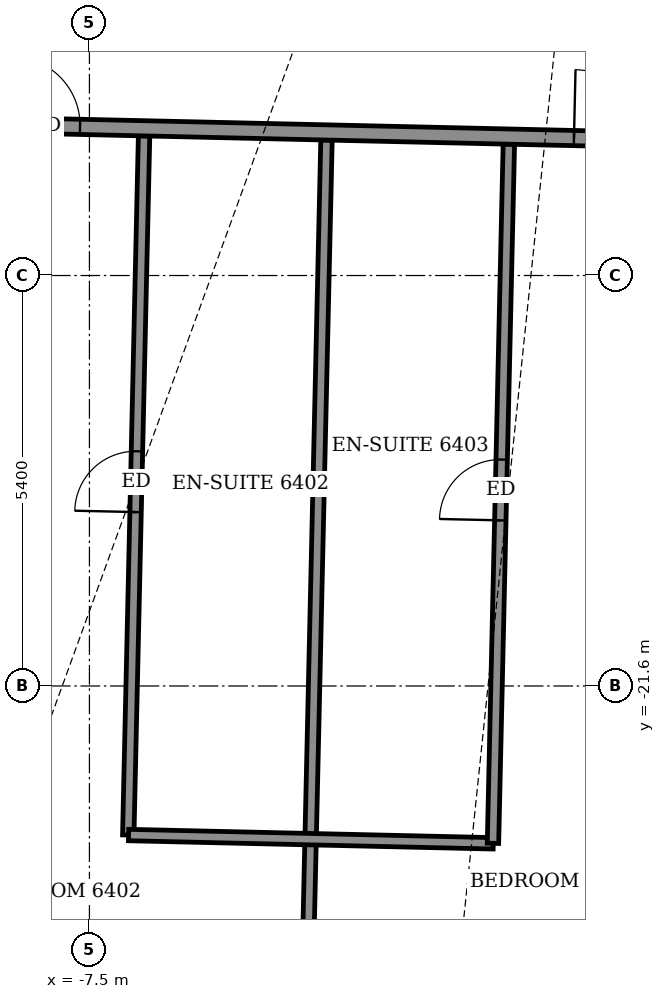
"""IFC4 building model, lengths in metres.
Left out: names, types, materials, properties, quantities, classifications, styles, units other than length and angle.
Written with IfcOpenShell. Run it as: python <this file> out.ifc"""

import sys

from ifc_helpers import new_model, si_unit, direction, frame, frame_2d, origin, place, context, subcontext, project, spatial, rectangle, extrude, element, fill, save


model = new_model("IFC4")
c1 = context("Model", 3, precision=1e-05, world=origin(), true_north=direction((0.0, 1.0)))
c2 = subcontext(c1, "Body", "Model", "MODEL_VIEW")
j1 = project(units=[si_unit("LENGTHUNIT", "METRE"), si_unit("PLANEANGLEUNIT", "RADIAN")], contexts=[c1])
p1 = place(None, origin())
s1 = spatial("IfcSite", under=j1, at=p1, CompositionType="ELEMENT")
p2 = place(p1, origin())
s2 = spatial("IfcBuilding", under=s1, at=p2, CompositionType="ELEMENT")
p3 = place(p2, frame((0.0, 0.0, 252.7)))
s3 = spatial("IfcBuildingStorey", under=s2, at=p3, CompositionType="ELEMENT", Elevation=252.7)
p4 = place(p3, frame((-4.663, -26.814, 0.0), z_axis=(0.0, 0.0, 1.0), x_axis=(0.022741979748, 0.999741367733, 0.0)))
e1 = element("IfcWall", 1, at=p4, inside=s3, PredefinedType="PARTITIONING", context=c2, shape_type="SweptSolid", body=[
    extrude(rectangle(XDim=12.399, YDim=0.15, at=frame_2d((6.2, 0.0))), origin(), (0.0, 0.0, 1.0), 2.45),
])
p5 = place(p3, frame((-6.989, -23.561, 0.0), z_axis=(0.0, 0.0, 1.0), x_axis=(0.022608685365, 0.999744391005, 0.0)))
e2 = element("IfcWall", 2, at=p5, inside=s3, PredefinedType="PARTITIONING", context=c2, shape_type="SweptSolid", body=[
    extrude(rectangle(XDim=9.2, YDim=0.15, at=frame_2d((4.6, 0.0))), origin(), (0.0, 0.0, 1.0), 2.55),
])
p6 = place(p5, frame((4.25, 0.0, 0.0)))
e3 = element("IfcOpeningElement", 3, at=p6, cuts=e2, PredefinedType="OPENING", context=c2, shape_type="SweptSolid", body=[
    extrude(rectangle(XDim=0.8, YDim=2.1, at=frame_2d((0.4, 1.05))), frame((0.0, 0.085, 0.0), z_axis=(0.0, -1.0, 0.0), x_axis=(1.0, 0.0, 0.0)), (0.0, 0.0, 1.0), 0.17),
])
p7 = place(p3, frame((-6.985, -23.561, 0.0), z_axis=(0.0, 0.0, 1.0), x_axis=(0.999742596585, -0.02268789488, 0.0)))
e4 = element("IfcWall", 4, at=p7, inside=s3, PredefinedType="PARTITIONING", context=c2, shape_type="SweptSolid", body=[
    extrude(rectangle(XDim=4.799, YDim=0.15, at=frame_2d((2.4, 0.0))), origin(), (0.0, 0.0, 1.0), 2.65),
])
p8 = place(p3, frame((-2.191, -23.67, 0.0), z_axis=(0.0, 0.0, 1.0), x_axis=(0.02271477479, 0.999741986218, 0.0)))
e5 = element("IfcWall", 5, at=p8, inside=s3, PredefinedType="PARTITIONING", context=c2, shape_type="SweptSolid", body=[
    extrude(rectangle(XDim=9.2, YDim=0.15, at=frame_2d((4.6, 0.0))), origin(), (0.0, 0.0, 1.0), 2.65),
])
p9 = place(p8, frame((4.25, 0.0, 0.0)))
e6 = element("IfcOpeningElement", 6, at=p9, cuts=e5, PredefinedType="OPENING", context=c2, shape_type="SweptSolid", body=[
    extrude(rectangle(XDim=0.8, YDim=2.1, at=frame_2d((0.4, 1.05))), frame((0.0, 0.085, 0.0), z_axis=(0.0, -1.0, 0.0), x_axis=(1.0, 0.0, 0.0)), (0.0, 0.0, 1.0), 0.17),
])
p10 = place(p3, frame((-25.619, -13.836, 0.0), z_axis=(0.0, 0.0, 1.0), x_axis=(0.999742808343, -0.022678561832, 0.0)))
e7 = element("IfcWall", 7, at=p10, inside=s3, PredefinedType="PARTITIONING", context=c2, shape_type="SweptSolid", body=[
    extrude(rectangle(XDim=48.282, YDim=0.2, at=frame_2d((24.141, 0.0))), origin(), (0.0, 0.0, 1.0), 2.45),
])
p11 = place(p10, frame((3.125, 0.0, 0.0)))
e8 = element("IfcOpeningElement", 8, at=p11, cuts=e7, PredefinedType="OPENING", context=c2, shape_type="SweptSolid", body=[
    extrude(rectangle(XDim=1.0, YDim=2.1, at=frame_2d((0.5, 1.05))), frame((0.0, 0.11, 0.0), z_axis=(0.0, -1.0, 0.0), x_axis=(1.0, 0.0, 0.0)), (0.0, 0.0, 1.0), 0.22),
])
p12 = place(p10, frame((9.5, 0.0, 0.0)))
e9 = element("IfcOpeningElement", 9, at=p12, cuts=e7, PredefinedType="OPENING", context=c2, shape_type="SweptSolid", body=[
    extrude(rectangle(XDim=0.9, YDim=2.1, at=frame_2d((0.45, 1.05))), frame((0.0, 0.11, 0.0), z_axis=(0.0, -1.0, 0.0), x_axis=(1.0, 0.0, 0.0)), (0.0, 0.0, 1.0), 0.22),
])
p13 = place(p10, frame((14.5, 0.0, 0.0)))
e10 = element("IfcOpeningElement", 10, at=p13, cuts=e7, PredefinedType="OPENING", context=c2, shape_type="SweptSolid", body=[
    extrude(rectangle(XDim=0.9, YDim=2.1, at=frame_2d((0.45, 1.05))), frame((0.0, 0.11, 0.0), z_axis=(0.0, -1.0, 0.0), x_axis=(1.0, 0.0, 0.0)), (0.0, 0.0, 1.0), 0.22),
])
p14 = place(p10, frame((17.1, 0.0, 0.0)))
e11 = element("IfcOpeningElement", 11, at=p14, cuts=e7, PredefinedType="OPENING", context=c2, shape_type="SweptSolid", body=[
    extrude(rectangle(XDim=0.9, YDim=2.1, at=frame_2d((0.45, 1.05))), frame((0.0, 0.11, 0.0), z_axis=(0.0, -1.0, 0.0), x_axis=(1.0, 0.0, 0.0)), (0.0, 0.0, 1.0), 0.22),
])
p15 = place(p10, frame((24.5, 0.0, 0.0)))
e12 = element("IfcOpeningElement", 12, at=p15, cuts=e7, PredefinedType="OPENING", context=c2, shape_type="SweptSolid", body=[
    extrude(rectangle(XDim=0.9, YDim=2.1, at=frame_2d((0.45, 1.05))), frame((0.0, 0.11, 0.0), z_axis=(0.0, -1.0, 0.0), x_axis=(1.0, 0.0, 0.0)), (0.0, 0.0, 1.0), 0.22),
])
p16 = place(p10, frame((27.1, 0.0, 0.0)))
e13 = element("IfcOpeningElement", 13, at=p16, cuts=e7, PredefinedType="OPENING", context=c2, shape_type="SweptSolid", body=[
    extrude(rectangle(XDim=0.9, YDim=2.1, at=frame_2d((0.45, 1.05))), frame((0.0, 0.11, 0.0), z_axis=(0.0, -1.0, 0.0), x_axis=(1.0, 0.0, 0.0)), (0.0, 0.0, 1.0), 0.22),
])
p17 = place(p10, frame((35.825, 0.0, 0.0)))
e14 = element("IfcOpeningElement", 14, at=p17, cuts=e7, PredefinedType="OPENING", context=c2, shape_type="SweptSolid", body=[
    extrude(rectangle(XDim=1.0, YDim=2.1, at=frame_2d((0.5, 1.05))), frame((0.0, 0.11, 0.0), z_axis=(0.0, -1.0, 0.0), x_axis=(1.0, 0.0, 0.0)), (0.0, 0.0, 1.0), 0.22),
])
p18 = place(p10, frame((32.1, 0.0, 0.0)))
e15 = element("IfcOpeningElement", 15, at=p18, cuts=e7, PredefinedType="OPENING", context=c2, shape_type="SweptSolid", body=[
    extrude(rectangle(XDim=0.9, YDim=2.1, at=frame_2d((0.45, 1.05))), frame((0.0, 0.11, 0.0), z_axis=(0.0, -1.0, 0.0), x_axis=(1.0, 0.0, 0.0)), (0.0, 0.0, 1.0), 0.22),
])
p19 = place(p10, frame((39.825, 0.0, 0.0)))
e16 = element("IfcOpeningElement", 16, at=p19, cuts=e7, PredefinedType="OPENING", context=c2, shape_type="SweptSolid", body=[
    extrude(rectangle(XDim=1.0, YDim=2.1, at=frame_2d((0.5, 1.05))), frame((0.0, 0.11, 0.0), z_axis=(0.0, -1.0, 0.0), x_axis=(1.0, 0.0, 0.0)), (0.0, 0.0, 1.0), 0.22),
])
p20 = place(p10, frame((47.083, 0.0, 0.0)))
e17 = element("IfcOpeningElement", 17, at=p20, cuts=e7, PredefinedType="OPENING", context=c2, shape_type="SweptSolid", body=[
    extrude(rectangle(XDim=1.0, YDim=2.1, at=frame_2d((0.5, 1.05))), frame((0.0, 0.11, 0.0), z_axis=(0.0, -1.0, 0.0), x_axis=(1.0, 0.0, 0.0)), (0.0, 0.0, 1.0), 0.22),
])
p21 = place(p14, origin())
e18 = element("IfcDoor", 18, at=p21, inside=s3, OperationType="SINGLE_SWING_RIGHT", PredefinedType="DOOR", context=c2, shape_type="SweptSolid", body=[
    extrude(rectangle(XDim=0.9, YDim=2.1, at=frame_2d((0.45, 1.05))), frame((0.0, 0.025, 0.0), z_axis=(0.0, -1.0, 0.0), x_axis=(1.0, 0.0, 0.0)), (0.0, 0.0, 1.0), 0.05),
])
fill(e11, e18)
p22 = place(p6, origin())
e19 = element("IfcDoor", 19, at=p22, inside=s3, OperationType="SINGLE_SWING_RIGHT", PredefinedType="DOOR", context=c2, shape_type="SweptSolid", body=[
    extrude(rectangle(XDim=0.8, YDim=2.1, at=frame_2d((0.4, 1.05))), frame((0.0, 0.025, 0.0), z_axis=(0.0, -1.0, 0.0), x_axis=(1.0, 0.0, 0.0)), (0.0, 0.0, 1.0), 0.05),
])
fill(e3, e19)
p23 = place(p15, origin())
e20 = element("IfcDoor", 20, at=p23, inside=s3, OperationType="SINGLE_SWING_LEFT", PredefinedType="DOOR", context=c2, shape_type="SweptSolid", body=[
    extrude(rectangle(XDim=0.9, YDim=2.1, at=frame_2d((0.45, 1.05))), frame((0.0, 0.025, 0.0), z_axis=(0.0, -1.0, 0.0), x_axis=(1.0, 0.0, 0.0)), (0.0, 0.0, 1.0), 0.05),
])
fill(e12, e20)
p24 = place(p9, origin())
e21 = element("IfcDoor", 21, at=p24, inside=s3, OperationType="SINGLE_SWING_LEFT", PredefinedType="DOOR", context=c2, shape_type="SweptSolid", body=[
    extrude(rectangle(XDim=0.8, YDim=2.1, at=frame_2d((0.4, 1.05))), frame((0.0, 0.025, 0.0), z_axis=(0.0, -1.0, 0.0), x_axis=(1.0, 0.0, 0.0)), (0.0, 0.0, 1.0), 0.05),
])
fill(e6, e21)
save(model, sys.argv[1])
